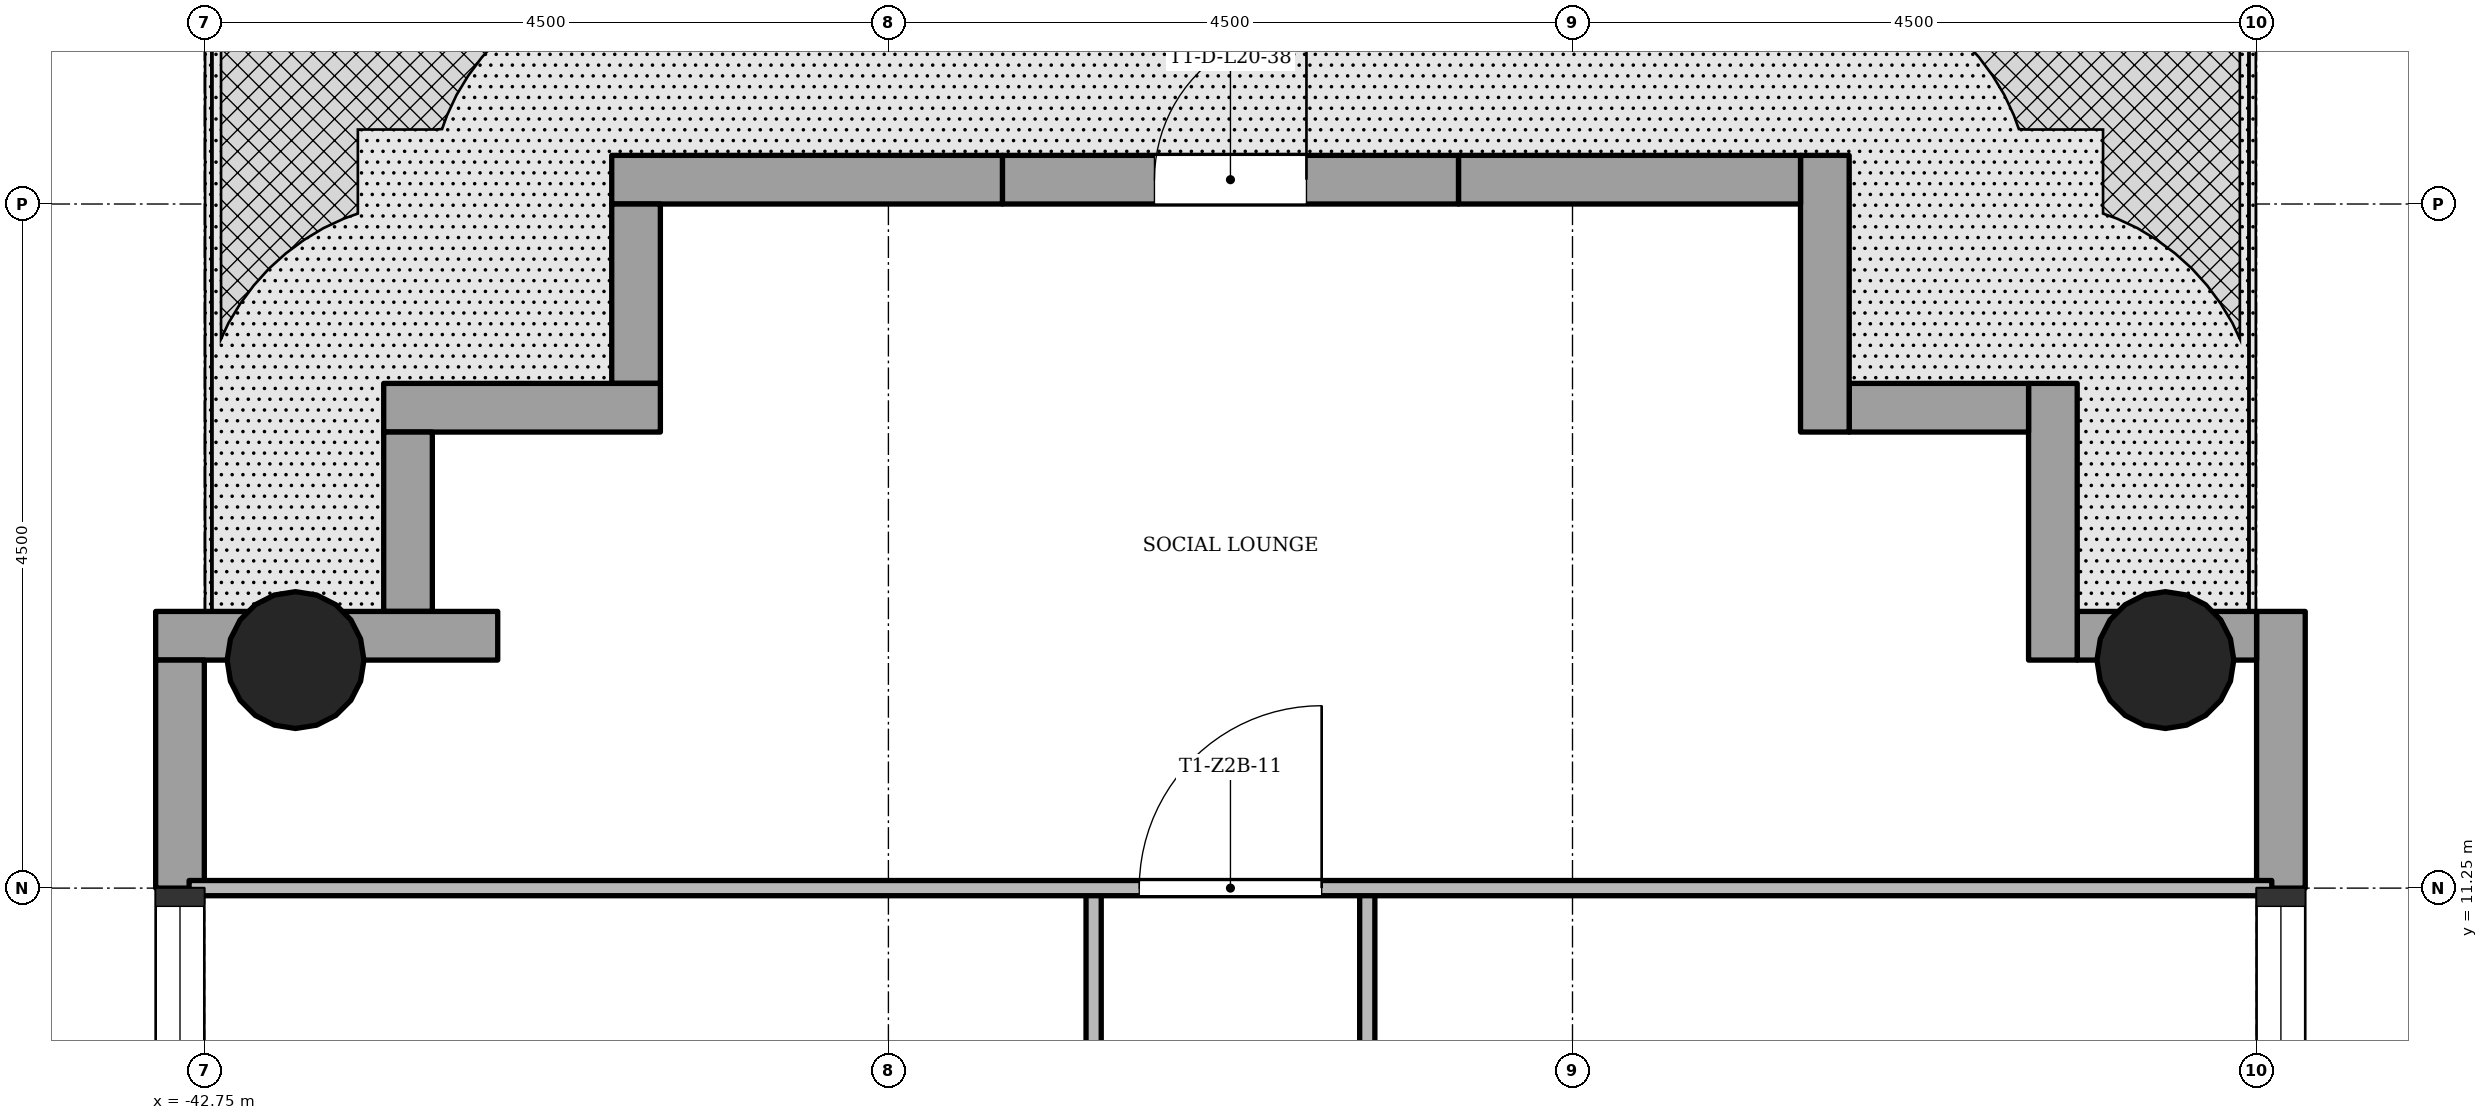
"""IFC4 building model, lengths in metres.
Left out: names, types, materials, properties, quantities, classifications, styles, units other than length and angle.
Written with IfcOpenShell. Run it as: python <this file> out.ifc"""

import sys

from ifc_helpers import new_model, si_unit, direction, frame, frame_2d, origin, origin_2d, place, context, subcontext, project, spatial, rectangle, hollow_circle, extrude, element, fill, save


model = new_model("IFC4")
c1 = context("Model", 3, precision=1e-05, world=origin(), true_north=direction((0.0, 1.0)))
c2 = subcontext(c1, "Body", "Model", "MODEL_VIEW")
j1 = project(units=[si_unit("LENGTHUNIT", "METRE"), si_unit("PLANEANGLEUNIT", "RADIAN")], contexts=[c1])
p1 = place(None, origin())
s1 = spatial("IfcSite", under=j1, at=p1, CompositionType="ELEMENT")
p2 = place(p1, origin())
s2 = spatial("IfcBuilding", under=s1, at=p2, CompositionType="ELEMENT")
p3 = place(p2, frame((0.0, 0.0, 76.6)))
s3 = spatial("IfcBuildingStorey", under=s2, at=p3, CompositionType="ELEMENT", Elevation=76.6)
for number, where, z_axis, x_axis in (
    (1, (-29.85, 12.75, 0.0), (0.0, 0.0, 1.0), (1.0, 0.0, 0.0)),
    (2, (-42.15, 12.75, 0.0), (0.0, 0.0, 1.0), (1.0, 0.0, 0.0)),
):
    element("IfcColumn", number, at=place(p3, frame(where, z_axis=z_axis, x_axis=x_axis)), inside=s3, PredefinedType="COLUMN", context=c2, shape_type="SweptSolid", body=[
        extrude(hollow_circle(Radius=0.45, WallThickness=0.032, at=origin_2d()), origin(), (0.0, 0.0, 1.0), 3.4),
    ])
p4 = place(p3, frame((-29.09, 11.25, 0.0), z_axis=(0.0, 0.0, 1.0), x_axis=(0.0, 1.0, 0.0)))
e3 = element("IfcWall", 3, at=p4, inside=s3, PredefinedType="STANDARD", context=c2, shape_type="SweptSolid", body=[
    extrude(rectangle(XDim=1.82, YDim=0.32, at=frame_2d((0.91, 0.0))), origin(), (0.0, 0.0, 1.0), 3.1),
])
p5 = place(p3, frame((-29.25, 12.91, -0.02), z_axis=(0.0, 0.0, 1.0), x_axis=(-1.0, 0.0, 0.0)))
e4 = element("IfcWall", 4, at=p5, inside=s3, PredefinedType="STANDARD", context=c2, shape_type="SweptSolid", body=[
    extrude(rectangle(XDim=1.18, YDim=0.32, at=frame_2d((0.59, 0.0))), origin(), (0.0, 0.0, 1.0), 3.12),
])
p6 = place(p3, frame((-30.59, 12.75, -0.02), z_axis=(0.0, 0.0, 1.0), x_axis=(0.0, 1.0, 0.0)))
e5 = element("IfcWall", 5, at=p6, inside=s3, PredefinedType="STANDARD", context=c2, shape_type="SweptSolid", body=[
    extrude(rectangle(XDim=1.82, YDim=0.32, at=frame_2d((0.91, 0.0))), origin(), (0.0, 0.0, 1.0), 3.12),
])
p7 = place(p3, frame((-30.75, 14.41, -0.02), z_axis=(0.0, 0.0, 1.0), x_axis=(-1.0, 0.0, 0.0)))
e6 = element("IfcWall", 6, at=p7, inside=s3, PredefinedType="STANDARD", context=c2, shape_type="SweptSolid", body=[
    extrude(rectangle(XDim=1.18, YDim=0.32, at=frame_2d((0.59, 0.0))), origin(), (0.0, 0.0, 1.0), 3.12),
])
p8 = place(p3, frame((-32.09, 14.25, -0.02), z_axis=(0.0, 0.0, 1.0), x_axis=(0.0, 1.0, 0.0)))
e7 = element("IfcWall", 7, at=p8, inside=s3, PredefinedType="STANDARD", context=c2, shape_type="SweptSolid", body=[
    extrude(rectangle(XDim=1.82, YDim=0.32, at=frame_2d((0.91, 0.0))), origin(), (0.0, 0.0, 1.0), 3.12),
])
p9 = place(p3, frame((-32.25, 15.91, -0.02), z_axis=(0.0, 0.0, 1.0), x_axis=(-1.0, 0.0, 0.0)))
e8 = element("IfcWall", 8, at=p9, inside=s3, PredefinedType="STANDARD", context=c2, shape_type="SweptSolid", body=[
    extrude(rectangle(XDim=2.25, YDim=0.32, at=frame_2d((1.125, 0.0))), origin(), (0.0, 0.0, 1.0), 3.12),
])
p10 = place(p3, frame((-34.5, 15.91, -0.02), z_axis=(0.0, 0.0, 1.0), x_axis=(-1.0, 0.0, 0.0)))
e9 = element("IfcWall", 9, at=p10, inside=s3, PredefinedType="STANDARD", context=c2, shape_type="SweptSolid", body=[
    extrude(rectangle(XDim=3.0, YDim=0.32, at=frame_2d((1.5, 0.0))), origin(), (0.0, 0.0, 1.0), 3.12),
])
p11 = place(p10, frame((1.0, 0.0, 0.02)))
e10 = element("IfcOpeningElement", 10, at=p11, cuts=e9, PredefinedType="OPENING", context=c2, shape_type="SweptSolid", body=[
    extrude(rectangle(XDim=1.0, YDim=2.1, at=frame_2d((0.5, 1.05))), frame((0.0, 0.17, 0.0), z_axis=(0.0, -1.0, 0.0), x_axis=(1.0, 0.0, 0.0)), (0.0, 0.0, 1.0), 0.34),
])
p12 = place(p3, frame((-37.5, 15.91, -0.02), z_axis=(0.0, 0.0, 1.0), x_axis=(-1.0, 0.0, 0.0)))
e11 = element("IfcWall", 11, at=p12, inside=s3, PredefinedType="STANDARD", context=c2, shape_type="SweptSolid", body=[
    extrude(rectangle(XDim=2.57, YDim=0.32, at=frame_2d((1.285, 0.0))), origin(), (0.0, 0.0, 1.0), 3.12),
])
p13 = place(p3, frame((-39.91, 15.75, -0.02), z_axis=(0.0, 0.0, 1.0), x_axis=(0.0, -1.0, 0.0)))
e12 = element("IfcWall", 12, at=p13, inside=s3, PredefinedType="STANDARD", context=c2, shape_type="SweptSolid", body=[
    extrude(rectangle(XDim=1.18, YDim=0.32, at=frame_2d((0.59, 0.0))), origin(), (0.0, 0.0, 1.0), 3.12),
])
p14 = place(p3, frame((-39.75, 14.41, -0.02), z_axis=(0.0, 0.0, 1.0), x_axis=(-1.0, 0.0, 0.0)))
e13 = element("IfcWall", 13, at=p14, inside=s3, PredefinedType="STANDARD", context=c2, shape_type="SweptSolid", body=[
    extrude(rectangle(XDim=1.82, YDim=0.32, at=frame_2d((0.91, 0.0))), origin(), (0.0, 0.0, 1.0), 3.12),
])
p15 = place(p3, frame((-41.41, 14.25, -0.02), z_axis=(0.0, 0.0, 1.0), x_axis=(0.0, -1.0, 0.0)))
e14 = element("IfcWall", 14, at=p15, inside=s3, PredefinedType="STANDARD", context=c2, shape_type="SweptSolid", body=[
    extrude(rectangle(XDim=1.18, YDim=0.32, at=frame_2d((0.59, 0.0))), origin(), (0.0, 0.0, 1.0), 3.12),
])
p16 = place(p3, frame((-40.82, 12.91, -0.02), z_axis=(0.0, 0.0, 1.0), x_axis=(-1.0, 0.0, 0.0)))
e15 = element("IfcWall", 15, at=p16, inside=s3, PredefinedType="STANDARD", context=c2, shape_type="SweptSolid", body=[
    extrude(rectangle(XDim=2.25, YDim=0.32, at=frame_2d((1.125, 0.0))), origin(), (0.0, 0.0, 1.0), 3.12),
])
p17 = place(p3, frame((-42.91, 12.75, 0.0), z_axis=(0.0, 0.0, 1.0), x_axis=(0.0, -1.0, 0.0)))
e16 = element("IfcWall", 16, at=p17, inside=s3, PredefinedType="STANDARD", context=c2, shape_type="SweptSolid", body=[
    extrude(rectangle(XDim=1.5, YDim=0.32, at=frame_2d((0.75, 0.0))), origin(), (0.0, 0.0, 1.0), 3.1),
])
p18 = place(p3, frame((-36.9, 1.5, 0.0), z_axis=(0.0, 0.0, 1.0), x_axis=(0.0, 1.0, 0.0)))
e17 = element("IfcWall", 17, at=p18, inside=s3, PredefinedType="PARTITIONING", context=c2, shape_type="SweptSolid", body=[
    extrude(rectangle(XDim=9.75, YDim=0.1, at=frame_2d((4.875, 0.0))), origin(), (0.0, 0.0, 1.0), 3.0),
])
p19 = place(p18, frame((0.75, 0.0, 0.0)))
e18 = element("IfcOpeningElement", 18, at=p19, cuts=e17, PredefinedType="OPENING", context=c2, shape_type="SweptSolid", body=[
    extrude(rectangle(XDim=0.9, YDim=2.1, at=frame_2d((0.45, 1.05))), frame((0.0, 0.06, 0.0), z_axis=(0.0, -1.0, 0.0), x_axis=(1.0, 0.0, 0.0)), (0.0, 0.0, 1.0), 0.12),
])
p20 = place(p18, frame((7.05, 0.0, 0.0)))
e19 = element("IfcOpeningElement", 19, at=p20, cuts=e17, PredefinedType="OPENING", context=c2, shape_type="SweptSolid", body=[
    extrude(rectangle(XDim=0.9, YDim=2.1, at=frame_2d((0.45, 1.05))), frame((0.0, 0.06, 0.0), z_axis=(0.0, -1.0, 0.0), x_axis=(1.0, 0.0, 0.0)), (0.0, 0.0, 1.0), 0.12),
])
p21 = place(p3, frame((-35.1, 1.5, 0.0), z_axis=(0.0, 0.0, 1.0), x_axis=(0.0, 1.0, 0.0)))
e20 = element("IfcWall", 20, at=p21, inside=s3, PredefinedType="PARTITIONING", context=c2, shape_type="SweptSolid", body=[
    extrude(rectangle(XDim=9.75, YDim=0.1, at=frame_2d((4.875, 0.0))), origin(), (0.0, 0.0, 1.0), 3.0),
])
p22 = place(p21, frame((2.175, 0.0, 0.0)))
e21 = element("IfcOpeningElement", 21, at=p22, cuts=e20, PredefinedType="OPENING", context=c2, shape_type="SweptSolid", body=[
    extrude(rectangle(XDim=0.9, YDim=2.1, at=frame_2d((0.45, 1.05))), frame((0.0, 0.06, 0.0), z_axis=(0.0, -1.0, 0.0), x_axis=(1.0, 0.0, 0.0)), (0.0, 0.0, 1.0), 0.12),
])
p23 = place(p21, frame((7.05, 0.0, 0.0)))
e22 = element("IfcOpeningElement", 22, at=p23, cuts=e20, PredefinedType="OPENING", context=c2, shape_type="SweptSolid", body=[
    extrude(rectangle(XDim=0.9, YDim=2.1, at=frame_2d((0.45, 1.05))), frame((0.0, 0.06, 0.0), z_axis=(0.0, -1.0, 0.0), x_axis=(1.0, 0.0, 0.0)), (0.0, 0.0, 1.0), 0.12),
])
p24 = place(p3, frame((-42.85, 11.25, 0.0), z_axis=(0.0, 0.0, 1.0), x_axis=(1.0, 0.0, 0.0)))
e23 = element("IfcWall", 23, at=p24, inside=s3, PredefinedType="PARTITIONING", context=c2, shape_type="SweptSolid", body=[
    extrude(rectangle(XDim=13.7, YDim=0.1, at=frame_2d((6.85, 0.0))), origin(), (0.0, 0.0, 1.0), 3.0),
])
p25 = place(p24, frame((6.25, 0.0, 0.0)))
e24 = element("IfcOpeningElement", 24, at=p25, cuts=e23, PredefinedType="OPENING", context=c2, shape_type="SweptSolid", body=[
    extrude(rectangle(XDim=1.2, YDim=2.1, at=frame_2d((0.6, 1.05))), frame((0.0, 0.06, 0.0), z_axis=(0.0, -1.0, 0.0), x_axis=(1.0, 0.0, 0.0)), (0.0, 0.0, 1.0), 0.12),
])
p26 = place(p11, origin())
e25 = element("IfcDoor", 25, at=p26, inside=s3, OperationType="SINGLE_SWING_LEFT", PredefinedType="DOOR", context=c2, shape_type="SweptSolid", body=[
    extrude(rectangle(XDim=1.0, YDim=2.1, at=frame_2d((0.5, 1.05))), frame((0.0, 0.025, 0.0), z_axis=(0.0, -1.0, 0.0), x_axis=(1.0, 0.0, 0.0)), (0.0, 0.0, 1.0), 0.05),
])
fill(e10, e25)
p27 = place(p25, origin())
e26 = element("IfcDoor", 26, at=p27, inside=s3, OperationType="SINGLE_SWING_LEFT", PredefinedType="DOOR", context=c2, shape_type="SweptSolid", body=[
    extrude(rectangle(XDim=1.2, YDim=2.1, at=frame_2d((0.6, 1.05))), frame((0.0, 0.025, 0.0), z_axis=(0.0, -1.0, 0.0), x_axis=(1.0, 0.0, 0.0)), (0.0, 0.0, 1.0), 0.05),
])
fill(e24, e26)
save(model, sys.argv[1])
